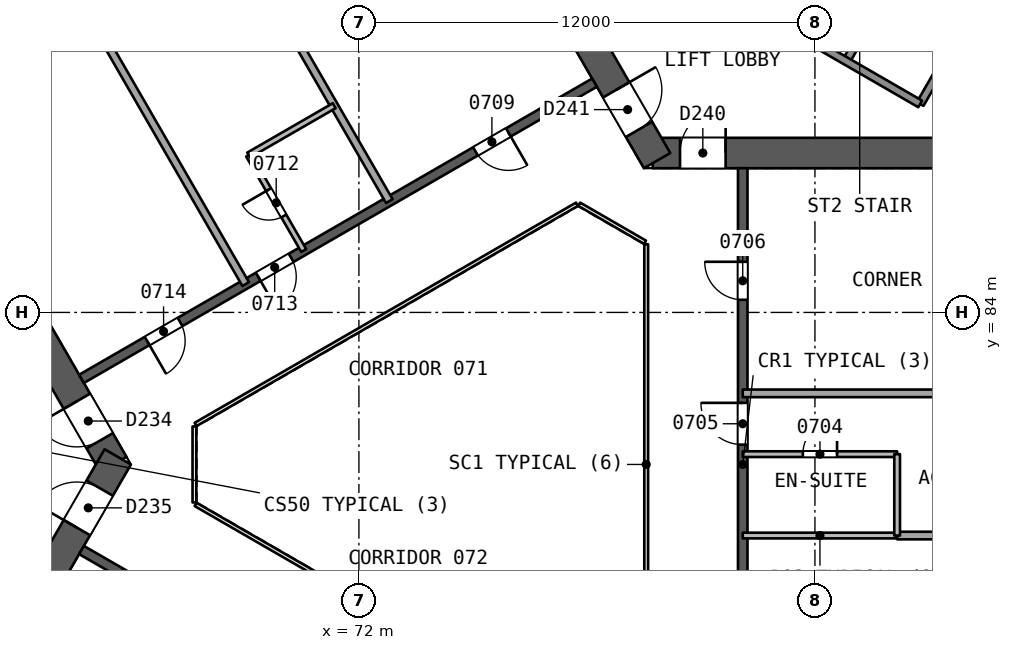
"""IFC4 building model, lengths in metres.
Left out: names, types, materials, properties, quantities, classifications, styles, units other than length and angle.
Written with IfcOpenShell. Run it as: python <this file> out.ifc"""

import sys

from ifc_helpers import new_model, si_unit, direction, frame, frame_2d, origin, place, context, subcontext, project, spatial, rectangle, extrude, element, fill, save


model = new_model("IFC4")
c1 = context("Model", 3, precision=1e-05, world=origin(), true_north=direction((0.0, 1.0)))
c2 = subcontext(c1, "Body", "Model", "MODEL_VIEW")
j1 = project(units=[si_unit("LENGTHUNIT", "METRE"), si_unit("PLANEANGLEUNIT", "RADIAN")], contexts=[c1])
p1 = place(None, origin())
s1 = spatial("IfcSite", under=j1, at=p1, CompositionType="ELEMENT")
p2 = place(p1, origin())
s2 = spatial("IfcBuilding", under=s1, at=p2, CompositionType="ELEMENT")
p3 = place(p2, frame((0.0, 0.0, 37.4)))
s3 = spatial("IfcBuildingStorey", under=s2, at=p3, CompositionType="ELEMENT", Elevation=37.4)
p4 = place(p3, frame((65.538, 80.0, 0.0), z_axis=(0.0, 0.0, 1.0), x_axis=(-0.49999662545, 0.866027352073, 0.0)))
e1 = element("IfcWall", 1, at=p4, inside=s3, PredefinedType="SHEAR", context=c2, shape_type="SweptSolid", body=[
    extrude(rectangle(XDim=10.149, YDim=0.8, at=frame_2d((5.074, 0.0))), origin(), (0.0, 0.0, 1.0), 3.7),
])
p5 = place(p4, frame((0.719, 0.0, 0.0)))
e2 = element("IfcOpeningElement", 2, at=p5, cuts=e1, PredefinedType="OPENING", context=c2, shape_type="SweptSolid", body=[
    extrude(rectangle(XDim=1.2, YDim=2.1, at=frame_2d((0.6, 1.05))), frame((0.0, 0.411, 0.0), z_axis=(0.0, -1.0, 0.0), x_axis=(1.0, 0.0, 0.0)), (0.0, 0.0, 1.0), 0.821),
])
p6 = place(p3, frame((60.664, 71.557, 0.0), z_axis=(0.0, 0.0, 1.0), x_axis=(0.50000409368, 0.866023040284, 0.0)))
e3 = element("IfcWall", 3, at=p6, inside=s3, PredefinedType="SHEAR", context=c2, shape_type="SweptSolid", body=[
    extrude(rectangle(XDim=9.98, YDim=0.8, at=frame_2d((4.99, 0.0))), origin(), (0.0, 0.0, 1.0), 3.7),
])
p7 = place(p6, frame((7.83, 0.0, 0.0)))
e4 = element("IfcOpeningElement", 4, at=p7, cuts=e3, PredefinedType="OPENING", context=c2, shape_type="SweptSolid", body=[
    extrude(rectangle(XDim=1.2, YDim=2.1, at=frame_2d((0.6, 1.05))), frame((0.0, 0.411, 0.0), z_axis=(0.0, -1.0, 0.0), x_axis=(1.0, 0.0, 0.0)), (0.0, 0.0, 1.0), 0.821),
])
p8 = place(p3, frame((79.731, 88.194, 0.0), z_axis=(0.0, 0.0, 1.0), x_axis=(1.0, 0.0, 0.0)))
e5 = element("IfcWall", 5, at=p8, inside=s3, PredefinedType="SHEAR", context=c2, shape_type="SweptSolid", body=[
    extrude(rectangle(XDim=10.149, YDim=0.8, at=frame_2d((5.074, 0.0))), origin(), (0.0, 0.0, 1.0), 3.7),
])
p9 = place(p8, frame((0.719, 0.0, 0.0)))
e6 = element("IfcOpeningElement", 6, at=p9, cuts=e5, PredefinedType="OPENING", context=c2, shape_type="SweptSolid", body=[
    extrude(rectangle(XDim=1.2, YDim=2.1, at=frame_2d((0.6, 1.05))), frame((0.0, 0.411, 0.0), z_axis=(0.0, -1.0, 0.0), x_axis=(1.0, 0.0, 0.0)), (0.0, 0.0, 1.0), 0.821),
])
p10 = place(p3, frame((74.856, 96.637, 0.0), z_axis=(0.0, 0.0, 1.0), x_axis=(0.499993500917, -0.866029155999, 0.0)))
e7 = element("IfcWall", 7, at=p10, inside=s3, PredefinedType="SHEAR", context=c2, shape_type="SweptSolid", body=[
    extrude(rectangle(XDim=9.98, YDim=0.8, at=frame_2d((4.99, 0.0))), origin(), (0.0, 0.0, 1.0), 3.7),
])
p11 = place(p10, frame((7.83, 0.0, 0.0)))
e8 = element("IfcOpeningElement", 8, at=p11, cuts=e7, PredefinedType="OPENING", context=c2, shape_type="SweptSolid", body=[
    extrude(rectangle(XDim=1.2, YDim=2.1, at=frame_2d((0.6, 1.05))), frame((0.0, 0.411, 0.0), z_axis=(0.0, -1.0, 0.0), x_axis=(1.0, 0.0, 0.0)), (0.0, 0.0, 1.0), 0.821),
])
p12 = place(p3, frame((82.1, 72.206, 0.0), z_axis=(0.0, 0.0, 1.0), x_axis=(0.0, 1.0, 0.0)))
e9 = element("IfcWall", 9, at=p12, inside=s3, PredefinedType="SHEAR", context=c2, shape_type="SweptSolid", body=[
    extrude(rectangle(XDim=15.588, YDim=0.25, at=frame_2d((7.794, 0.0))), origin(), (0.0, 0.0, 1.0), 3.2),
])
p13 = place(p12, frame((2.462, 0.0, 0.0)))
e10 = element("IfcOpeningElement", 10, at=p13, cuts=e9, PredefinedType="OPENING", context=c2, shape_type="SweptSolid", body=[
    extrude(rectangle(XDim=1.0, YDim=2.1, at=frame_2d((0.5, 1.05))), frame((0.0, 0.135, 0.0), z_axis=(0.0, -1.0, 0.0), x_axis=(1.0, 0.0, 0.0)), (0.0, 0.0, 1.0), 0.271),
])
p14 = place(p12, frame((8.315, 0.0, 0.0)))
e11 = element("IfcOpeningElement", 11, at=p14, cuts=e9, PredefinedType="OPENING", context=c2, shape_type="SweptSolid", body=[
    extrude(rectangle(XDim=1.1, YDim=2.1, at=frame_2d((0.55, 1.05))), frame((0.0, 0.135, 0.0), z_axis=(0.0, -1.0, 0.0), x_axis=(1.0, 0.0, 0.0)), (0.0, 0.0, 1.0), 0.271),
])
p15 = place(p12, frame((12.127, 0.0, 0.0)))
e12 = element("IfcOpeningElement", 12, at=p15, cuts=e9, PredefinedType="OPENING", context=c2, shape_type="SweptSolid", body=[
    extrude(rectangle(XDim=1.0, YDim=2.1, at=frame_2d((0.5, 1.05))), frame((0.0, 0.135, 0.0), z_axis=(0.0, -1.0, 0.0), x_axis=(1.0, 0.0, 0.0)), (0.0, 0.0, 1.0), 0.271),
])
p16 = place(p3, frame((78.2, 90.046, 0.0), z_axis=(0.0, 0.0, 1.0), x_axis=(-0.866026492143, -0.499998114903, 0.0)))
e13 = element("IfcWall", 13, at=p16, inside=s3, PredefinedType="SHEAR", context=c2, shape_type="SweptSolid", body=[
    extrude(rectangle(XDim=15.588, YDim=0.25, at=frame_2d((7.794, 0.0))), origin(), (0.0, 0.0, 1.0), 3.2),
])
p17 = place(p16, frame((2.618, 0.0, 0.0)))
e14 = element("IfcOpeningElement", 14, at=p17, cuts=e13, PredefinedType="OPENING", context=c2, shape_type="SweptSolid", body=[
    extrude(rectangle(XDim=1.0, YDim=2.1, at=frame_2d((0.5, 1.05))), frame((0.0, 0.135, 0.0), z_axis=(0.0, -1.0, 0.0), x_axis=(1.0, 0.0, 0.0)), (0.0, 0.0, 1.0), 0.271),
])
p18 = place(p16, frame((9.218, 0.0, 0.0)))
e15 = element("IfcOpeningElement", 15, at=p18, cuts=e13, PredefinedType="OPENING", context=c2, shape_type="SweptSolid", body=[
    extrude(rectangle(XDim=1.0, YDim=2.1, at=frame_2d((0.5, 1.05))), frame((0.0, 0.135, 0.0), z_axis=(0.0, -1.0, 0.0), x_axis=(1.0, 0.0, 0.0)), (0.0, 0.0, 1.0), 0.271),
])
p19 = place(p16, frame((12.594, 0.0, 0.0)))
e16 = element("IfcOpeningElement", 16, at=p19, cuts=e13, PredefinedType="OPENING", context=c2, shape_type="SweptSolid", body=[
    extrude(rectangle(XDim=1.0, YDim=2.1, at=frame_2d((0.5, 1.05))), frame((0.0, 0.135, 0.0), z_axis=(0.0, -1.0, 0.0), x_axis=(1.0, 0.0, 0.0)), (0.0, 0.0, 1.0), 0.271),
])
p20 = place(p3, frame((64.7, 77.748, 0.0), z_axis=(0.0, 0.0, 1.0), x_axis=(0.866026492143, -0.499998114903, 0.0)))
e17 = element("IfcWall", 17, at=p20, inside=s3, PredefinedType="SHEAR", context=c2, shape_type="SweptSolid", body=[
    extrude(rectangle(XDim=15.588, YDim=0.25, at=frame_2d((7.794, 0.0))), origin(), (0.0, 0.0, 1.0), 3.2),
])
p21 = place(p20, frame((3.138, 0.0, 0.0)))
e18 = element("IfcOpeningElement", 18, at=p21, cuts=e17, PredefinedType="OPENING", context=c2, shape_type="SweptSolid", body=[
    extrude(rectangle(XDim=1.0, YDim=2.1, at=frame_2d((0.5, 1.05))), frame((0.0, 0.135, 0.0), z_axis=(0.0, -1.0, 0.0), x_axis=(1.0, 0.0, 0.0)), (0.0, 0.0, 1.0), 0.271),
])
p22 = place(p20, frame((9.006, 0.0, 0.0)))
e19 = element("IfcOpeningElement", 19, at=p22, cuts=e17, PredefinedType="OPENING", context=c2, shape_type="SweptSolid", body=[
    extrude(rectangle(XDim=1.1, YDim=2.1, at=frame_2d((0.55, 1.05))), frame((0.0, 0.135, 0.0), z_axis=(0.0, -1.0, 0.0), x_axis=(1.0, 0.0, 0.0)), (0.0, 0.0, 1.0), 0.271),
])
p23 = place(p20, frame((11.762, 0.0, 0.0)))
e20 = element("IfcOpeningElement", 20, at=p23, cuts=e17, PredefinedType="OPENING", context=c2, shape_type="SweptSolid", body=[
    extrude(rectangle(XDim=1.0, YDim=2.1, at=frame_2d((0.5, 1.05))), frame((0.0, 0.135, 0.0), z_axis=(0.0, -1.0, 0.0), x_axis=(1.0, 0.0, 0.0)), (0.0, 0.0, 1.0), 0.271),
])
p24 = place(p3, frame((96.202, 78.129, 0.0), z_axis=(0.0, 0.0, 1.0), x_axis=(-1.0, 0.0, 0.0)))
e21 = element("IfcWall", 21, at=p24, inside=s3, PredefinedType="PARTITIONING", context=c2, shape_type="SweptSolid", body=[
    extrude(rectangle(XDim=10.039, YDim=0.2, at=frame_2d((5.019, 0.0))), origin(), (0.0, 0.0, 1.0), 3.2),
])
p25 = place(p3, frame((86.163, 78.129, 0.0), z_axis=(0.0, 0.0, 1.0), x_axis=(-1.0, 0.0, 0.0)))
e22 = element("IfcWall", 22, at=p25, inside=s3, PredefinedType="PARTITIONING", context=c2, shape_type="SweptSolid", body=[
    extrude(rectangle(XDim=4.063, YDim=0.15, at=frame_2d((2.031, 0.0))), origin(), (0.0, 0.0, 1.0), 3.2),
])
p26 = place(p3, frame((82.1, 80.271, 0.0), z_axis=(0.0, 0.0, 1.0), x_axis=(1.0, 0.0, 0.0)))
e23 = element("IfcWall", 23, at=p26, inside=s3, PredefinedType="PARTITIONING", context=c2, shape_type="SweptSolid", body=[
    extrude(rectangle(XDim=4.063, YDim=0.15, at=frame_2d((2.031, 0.0))), origin(), (0.0, 0.0, 1.0), 3.2),
])
p27 = place(p26, frame((1.582, 0.0, 0.0)))
e24 = element("IfcOpeningElement", 24, at=p27, cuts=e23, PredefinedType="OPENING", context=c2, shape_type="SweptSolid", body=[
    extrude(rectangle(XDim=0.9, YDim=2.1, at=frame_2d((0.45, 1.05))), frame((0.0, 0.085, 0.0), z_axis=(0.0, -1.0, 0.0), x_axis=(1.0, 0.0, 0.0)), (0.0, 0.0, 1.0), 0.171),
])
p28 = place(p3, frame((86.163, 80.271, 0.0), z_axis=(0.0, 0.0, 1.0), x_axis=(0.0, -1.0, 0.0)))
e25 = element("IfcWall", 25, at=p28, inside=s3, PredefinedType="PARTITIONING", context=c2, shape_type="SweptSolid", body=[
    extrude(rectangle(XDim=2.141, YDim=0.15, at=frame_2d((1.071, 0.0))), origin(), (0.0, 0.0, 1.0), 3.2),
])
for number, where, z_axis, x_axis in (
    (26, (96.202, 81.871, 0.0), (0.0, 0.0, 1.0), (-1.0, 0.0, 0.0)),
    (27, (65.749, 99.141, 0.0), (0.0, 0.0, 1.0), (0.5, -0.866, 0.0)),
):
    element("IfcWall", number, at=place(p3, frame(where, z_axis=z_axis, x_axis=x_axis)), inside=s3, PredefinedType="PARTITIONING", context=c2, shape_type="SweptSolid", body=[
        extrude(rectangle(XDim=14.102, YDim=0.2, at=frame_2d((7.051, 0.0))), origin(), (0.0, 0.0, 1.0), 3.2),
    ])
p29 = place(p3, frame((70.548, 85.628, 0.0), z_axis=(0.0, 0.0, 1.0), x_axis=(-0.499987231761, 0.866032775405, 0.0)))
e28 = element("IfcWall", 28, at=p29, inside=s3, PredefinedType="PARTITIONING", context=c2, shape_type="SweptSolid", body=[
    extrude(rectangle(XDim=2.9, YDim=0.15, at=frame_2d((1.45, 0.0))), origin(), (0.0, 0.0, 1.0), 3.2),
])
p30 = place(p29, frame((1.05, 0.0, 0.0)))
e29 = element("IfcOpeningElement", 29, at=p30, cuts=e28, PredefinedType="OPENING", context=c2, shape_type="SweptSolid", body=[
    extrude(rectangle(XDim=0.8, YDim=2.1, at=frame_2d((0.4, 1.05))), frame((0.0, 0.085, 0.0), z_axis=(0.0, -1.0, 0.0), x_axis=(1.0, 0.0, 0.0)), (0.0, 0.0, 1.0), 0.171),
])
p31 = place(p3, frame((69.098, 88.14, 0.0), z_axis=(0.0, 0.0, 1.0), x_axis=(0.866021400173, 0.500006934395, 0.0)))
e30 = element("IfcWall", 30, at=p31, inside=s3, PredefinedType="PARTITIONING", context=c2, shape_type="SweptSolid", body=[
    extrude(rectangle(XDim=2.6, YDim=0.15, at=frame_2d((1.3, 0.0))), origin(), (0.0, 0.0, 1.0), 3.2),
])
p32 = place(p3, frame((61.969, 96.958, 0.0), z_axis=(0.0, 0.0, 1.0), x_axis=(0.499997206141, -0.866027016814, 0.0)))
e31 = element("IfcWall", 31, at=p32, inside=s3, PredefinedType="PARTITIONING", context=c2, shape_type="SweptSolid", body=[
    extrude(rectangle(XDim=14.102, YDim=0.2, at=frame_2d((7.051, 0.0))), origin(), (0.0, 0.0, 1.0), 3.2),
])
p33 = place(p3, frame((37.74, 83.141, 0.0), z_axis=(0.0, 0.0, 1.0), x_axis=(0.866026524777, 0.499998058379, 0.0)))
e32 = element("IfcWall", 32, at=p33, inside=s3, PredefinedType="SOLIDWALL", context=c2, shape_type="SweptSolid", body=[
    extrude(rectangle(XDim=61.395, YDim=0.3, at=frame_2d((30.698, 0.0))), origin(), (0.0, 0.0, 1.0), 3.2),
])
p34 = place(p33, frame((34.174, 0.0, 0.0)))
e33 = element("IfcOpeningElement", 33, at=p34, cuts=e32, PredefinedType="OPENING", context=c2, shape_type="SweptSolid", body=[
    extrude(rectangle(XDim=2.4, YDim=2.4, at=frame_2d((1.2, 1.2))), frame((0.0, 0.161, 0.0), z_axis=(0.0, -1.0, 0.0), x_axis=(1.0, 0.0, 0.0)), (0.0, 0.0, 1.0), 0.321),
])
p35 = place(p33, frame((47.603, 0.0, 0.0)))
e34 = element("IfcOpeningElement", 34, at=p35, cuts=e32, PredefinedType="OPENING", context=c2, shape_type="SweptSolid", body=[
    extrude(rectangle(XDim=2.4, YDim=2.4, at=frame_2d((1.2, 1.2))), frame((0.0, 0.161, 0.0), z_axis=(0.0, -1.0, 0.0), x_axis=(1.0, 0.0, 0.0)), (0.0, 0.0, 1.0), 0.321),
])
p36 = place(p33, frame((24.198, 0.0, 0.0)))
e35 = element("IfcOpeningElement", 35, at=p36, cuts=e32, PredefinedType="OPENING", context=c2, shape_type="SweptSolid", body=[
    extrude(rectangle(XDim=2.4, YDim=2.4, at=frame_2d((1.2, 1.2))), frame((0.0, 0.161, 0.0), z_axis=(0.0, -1.0, 0.0), x_axis=(1.0, 0.0, 0.0)), (0.0, 0.0, 1.0), 0.321),
])
p37 = place(p33, frame((11.394, 0.0, 0.0)))
e36 = element("IfcOpeningElement", 36, at=p37, cuts=e32, PredefinedType="OPENING", context=c2, shape_type="SweptSolid", body=[
    extrude(rectangle(XDim=2.4, YDim=2.4, at=frame_2d((1.2, 1.2))), frame((0.0, 0.161, 0.0), z_axis=(0.0, -1.0, 0.0), x_axis=(1.0, 0.0, 0.0)), (0.0, 0.0, 1.0), 0.321),
])
p38 = place(p33, frame((28.874, 0.0, 0.0)))
e37 = element("IfcOpeningElement", 37, at=p38, cuts=e32, PredefinedType="OPENING", context=c2, shape_type="SweptSolid", body=[
    extrude(rectangle(XDim=2.4, YDim=2.4, at=frame_2d((1.2, 1.2))), frame((0.0, 0.161, 0.0), z_axis=(0.0, -1.0, 0.0), x_axis=(1.0, 0.0, 0.0)), (0.0, 0.0, 1.0), 0.321),
])
for number, where, z_axis, x_axis in (
    (38, (86.77, 89.486, 0.0), (0.0, 0.0, 1.0), (0.5, 0.866, 0.0)),
    (39, (84.821, 90.611, 0.0), (0.0, 0.0, 1.0), (0.5, 0.866, 0.0)),
):
    element("IfcWall", number, at=place(p3, frame(where, z_axis=z_axis, x_axis=x_axis)), inside=s3, PredefinedType="SOLIDWALL", context=c2, shape_type="SweptSolid", body=[
        extrude(rectangle(XDim=2.48, YDim=0.2, at=frame_2d((1.24, 0.0))), origin(), (0.0, 0.0, 1.0), 3.2),
    ])
p39 = place(p3, frame((86.77, 89.486, 0.0), z_axis=(0.0, 0.0, 1.0), x_axis=(-0.86601811187, 0.500012629753, 0.0)))
e40 = element("IfcWall", 40, at=p39, inside=s3, PredefinedType="SOLIDWALL", context=c2, shape_type="SweptSolid", body=[
    extrude(rectangle(XDim=10.9, YDim=0.2, at=frame_2d((5.45, 0.0))), origin(), (0.0, 0.0, 1.0), 3.2),
])
p40 = place(p3, frame((79.56, 74.206, 0.0), z_axis=(0.0, 0.0, 1.0), x_axis=(0.0, 1.0, 0.0)))
e41 = element("IfcWall", 41, at=p40, inside=s3, PredefinedType="PARTITIONING", context=c2, shape_type="SweptSolid", body=[
    extrude(rectangle(XDim=11.588, YDim=0.1, at=frame_2d((5.794, 0.0))), origin(), (0.0, 0.0, 1.0), 3.2),
])
p41 = place(p3, frame((79.53, 85.846, 0.0), z_axis=(0.0, 0.0, 1.0), x_axis=(-0.866041268327, 0.499972520799, 0.0)))
e42 = element("IfcWall", 42, at=p41, inside=s3, PredefinedType="PARTITIONING", context=c2, shape_type="SweptSolid", body=[
    extrude(rectangle(XDim=2.0, YDim=0.1, at=frame_2d((1.0, 0.0))), origin(), (0.0, 0.0, 1.0), 3.2),
])
p42 = place(p3, frame((77.738, 86.846, 0.0), z_axis=(0.0, 0.0, 1.0), x_axis=(-0.866026658274, -0.499997827154, 0.0)))
e43 = element("IfcWall", 43, at=p42, inside=s3, PredefinedType="PARTITIONING", context=c2, shape_type="SweptSolid", body=[
    extrude(rectangle(XDim=11.588, YDim=0.1, at=frame_2d((5.794, 0.0))), origin(), (0.0, 0.0, 1.0), 3.2),
])
p43 = place(p3, frame((67.672, 81.0, 0.0), z_axis=(0.0, 0.0, 1.0), x_axis=(0.0, -1.0, 0.0)))
e44 = element("IfcWall", 44, at=p43, inside=s3, PredefinedType="PARTITIONING", context=c2, shape_type="SweptSolid", body=[
    extrude(rectangle(XDim=2.0, YDim=0.1, at=frame_2d((1.0, 0.0))), origin(), (0.0, 0.0, 1.0), 3.2),
])
p44 = place(p3, frame((67.702, 78.948, 0.0), z_axis=(0.0, 0.0, 1.0), x_axis=(0.866026658274, -0.499997827154, 0.0)))
e45 = element("IfcWall", 45, at=p44, inside=s3, PredefinedType="PARTITIONING", context=c2, shape_type="SweptSolid", body=[
    extrude(rectangle(XDim=11.588, YDim=0.1, at=frame_2d((5.794, 0.0))), origin(), (0.0, 0.0, 1.0), 3.2),
])
p45 = place(p27, origin())
e46 = element("IfcDoor", 46, at=p45, inside=s3, OperationType="SINGLE_SWING_RIGHT", PredefinedType="NOTDEFINED", context=c2, shape_type="SweptSolid", body=[
    extrude(rectangle(XDim=0.9, YDim=2.1, at=frame_2d((0.45, 1.05))), frame((0.0, 0.025, 0.0), z_axis=(0.0, -1.0, 0.0), x_axis=(1.0, 0.0, 0.0)), (0.0, 0.0, 1.0), 0.05),
])
fill(e24, e46)
p46 = place(p14, origin())
e47 = element("IfcDoor", 47, at=p46, inside=s3, OperationType="SINGLE_SWING_RIGHT", PredefinedType="NOTDEFINED", context=c2, shape_type="SweptSolid", body=[
    extrude(rectangle(XDim=1.1, YDim=2.1, at=frame_2d((0.55, 1.05))), frame((0.0, 0.025, 0.0), z_axis=(0.0, -1.0, 0.0), x_axis=(1.0, 0.0, 0.0)), (0.0, 0.0, 1.0), 0.05),
])
fill(e11, e47)
p47 = place(p15, origin())
e48 = element("IfcDoor", 48, at=p47, inside=s3, OperationType="SINGLE_SWING_RIGHT", PredefinedType="NOTDEFINED", context=c2, shape_type="SweptSolid", body=[
    extrude(rectangle(XDim=1.0, YDim=2.1, at=frame_2d((0.5, 1.05))), frame((0.0, 0.025, 0.0), z_axis=(0.0, -1.0, 0.0), x_axis=(1.0, 0.0, 0.0)), (0.0, 0.0, 1.0), 0.05),
])
fill(e12, e48)
p48 = place(p17, origin())
e49 = element("IfcDoor", 49, at=p48, inside=s3, OperationType="SINGLE_SWING_LEFT", PredefinedType="NOTDEFINED", context=c2, shape_type="SweptSolid", body=[
    extrude(rectangle(XDim=1.0, YDim=2.1, at=frame_2d((0.5, 1.05))), frame((0.0, 0.025, 0.0), z_axis=(0.0, -1.0, 0.0), x_axis=(1.0, 0.0, 0.0)), (0.0, 0.0, 1.0), 0.05),
])
fill(e14, e49)
p49 = place(p30, origin())
e50 = element("IfcDoor", 50, at=p49, inside=s3, OperationType="SINGLE_SWING_RIGHT", PredefinedType="NOTDEFINED", context=c2, shape_type="SweptSolid", body=[
    extrude(rectangle(XDim=0.8, YDim=2.1, at=frame_2d((0.4, 1.05))), frame((0.0, 0.025, 0.0), z_axis=(0.0, -1.0, 0.0), x_axis=(1.0, 0.0, 0.0)), (0.0, 0.0, 1.0), 0.05),
])
fill(e29, e50)
p50 = place(p18, origin())
e51 = element("IfcDoor", 51, at=p50, inside=s3, OperationType="SINGLE_SWING_RIGHT", PredefinedType="NOTDEFINED", context=c2, shape_type="SweptSolid", body=[
    extrude(rectangle(XDim=1.0, YDim=2.1, at=frame_2d((0.5, 1.05))), frame((0.0, 0.025, 0.0), z_axis=(0.0, -1.0, 0.0), x_axis=(1.0, 0.0, 0.0)), (0.0, 0.0, 1.0), 0.05),
])
fill(e15, e51)
p51 = place(p19, origin())
e52 = element("IfcDoor", 52, at=p51, inside=s3, OperationType="SINGLE_SWING_RIGHT", PredefinedType="NOTDEFINED", context=c2, shape_type="SweptSolid", body=[
    extrude(rectangle(XDim=1.0, YDim=2.1, at=frame_2d((0.5, 1.05))), frame((0.0, 0.025, 0.0), z_axis=(0.0, -1.0, 0.0), x_axis=(1.0, 0.0, 0.0)), (0.0, 0.0, 1.0), 0.05),
])
fill(e16, e52)
p52 = place(p5, origin())
e53 = element("IfcDoor", 53, at=p52, inside=s3, OperationType="SINGLE_SWING_RIGHT", PredefinedType="NOTDEFINED", context=c2, shape_type="SweptSolid", body=[
    extrude(rectangle(XDim=1.2, YDim=2.1, at=frame_2d((0.6, 1.05))), frame((0.0, 0.025, 0.0), z_axis=(0.0, -1.0, 0.0), x_axis=(1.0, 0.0, 0.0)), (0.0, 0.0, 1.0), 0.05),
])
fill(e2, e53)
p53 = place(p7, origin())
e54 = element("IfcDoor", 54, at=p53, inside=s3, OperationType="SINGLE_SWING_LEFT", PredefinedType="NOTDEFINED", context=c2, shape_type="SweptSolid", body=[
    extrude(rectangle(XDim=1.2, YDim=2.1, at=frame_2d((0.6, 1.05))), frame((0.0, 0.025, 0.0), z_axis=(0.0, -1.0, 0.0), x_axis=(1.0, 0.0, 0.0)), (0.0, 0.0, 1.0), 0.05),
])
fill(e4, e54)
p54 = place(p9, origin())
e55 = element("IfcDoor", 55, at=p54, inside=s3, OperationType="SINGLE_SWING_RIGHT", PredefinedType="NOTDEFINED", context=c2, shape_type="SweptSolid", body=[
    extrude(rectangle(XDim=1.2, YDim=2.1, at=frame_2d((0.6, 1.05))), frame((0.0, 0.025, 0.0), z_axis=(0.0, -1.0, 0.0), x_axis=(1.0, 0.0, 0.0)), (0.0, 0.0, 1.0), 0.05),
])
fill(e6, e55)
p55 = place(p11, origin())
e56 = element("IfcDoor", 56, at=p55, inside=s3, OperationType="SINGLE_SWING_LEFT", PredefinedType="NOTDEFINED", context=c2, shape_type="SweptSolid", body=[
    extrude(rectangle(XDim=1.2, YDim=2.1, at=frame_2d((0.6, 1.05))), frame((0.0, 0.025, 0.0), z_axis=(0.0, -1.0, 0.0), x_axis=(1.0, 0.0, 0.0)), (0.0, 0.0, 1.0), 0.05),
])
fill(e8, e56)
save(model, sys.argv[1])
